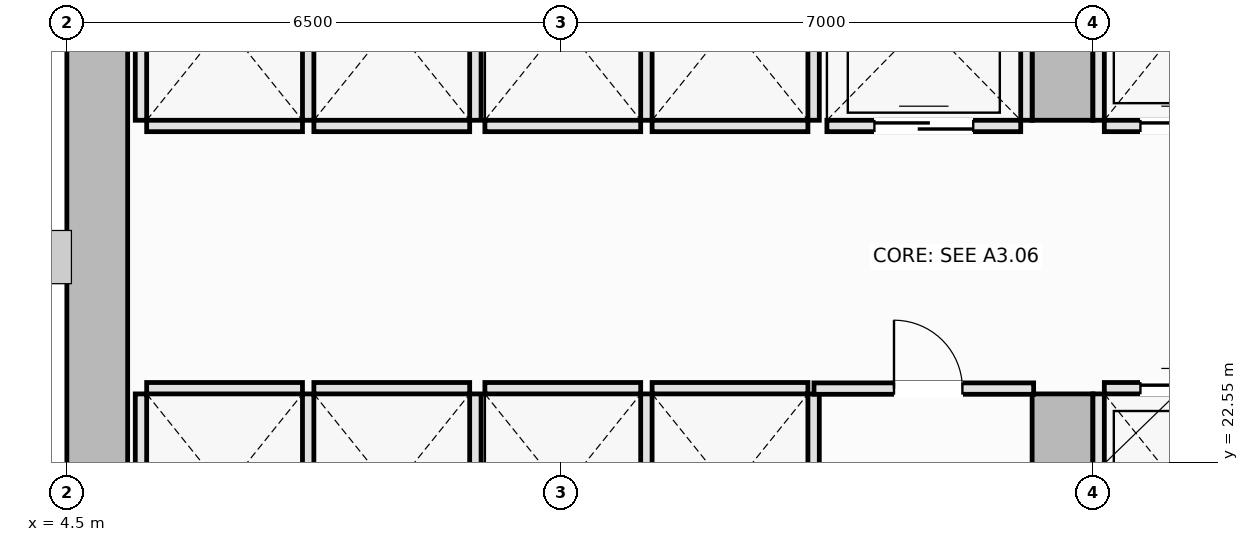
"""IFC4 building model, lengths in metres.
Left out: names, types, materials, properties, quantities, classifications, styles, units other than length and angle.
Written with IfcOpenShell. Run it as: python <this file> out.ifc"""

import sys

from ifc_helpers import new_model, si_unit, direction, frame, frame_2d, origin, place, context, subcontext, project, spatial, rectangle, extrude, element, fill, save


model = new_model("IFC4")
c1 = context("Model", 3, precision=1e-05, world=origin(), true_north=direction((0.0, 1.0)))
c2 = subcontext(c1, "Body", "Model", "MODEL_VIEW")
j1 = project(units=[si_unit("LENGTHUNIT", "METRE"), si_unit("PLANEANGLEUNIT", "RADIAN")], contexts=[c1])
p1 = place(None, origin())
s1 = spatial("IfcSite", under=j1, at=p1, CompositionType="ELEMENT")
p2 = place(p1, origin())
s2 = spatial("IfcBuilding", under=s1, at=p2, CompositionType="ELEMENT")
p3 = place(p2, frame((0.0, 0.0, 82.4)))
s3 = spatial("IfcBuildingStorey", under=s2, at=p3, CompositionType="ELEMENT", Elevation=82.4)
p4 = place(p3, frame((4.9, 14.8, 0.0), z_axis=(0.0, 0.0, 1.0), x_axis=(0.0, 1.0, 0.0)))
e1 = element("IfcWall", 1, at=p4, inside=s3, PredefinedType="SHEAR", context=c2, shape_type="SweptSolid", body=[
    extrude(rectangle(XDim=20.9, YDim=0.8, at=frame_2d((10.45, 0.0))), origin(), (0.0, 0.0, 1.0), 3.55),
])
p5 = place(p3, frame((17.6, 14.8, 0.0), z_axis=(0.0, 0.0, 1.0), x_axis=(0.0, 1.0, 0.0)))
e2 = element("IfcWall", 2, at=p5, inside=s3, PredefinedType="SHEAR", context=c2, shape_type="SweptSolid", body=[
    extrude(rectangle(XDim=8.65, YDim=0.8, at=frame_2d((4.325, 0.0))), origin(), (0.0, 0.0, 1.0), 3.55),
])
p6 = place(p5, frame((4.1, 0.0, 0.0)))
e3 = element("IfcOpeningElement", 3, at=p6, cuts=e2, PredefinedType="OPENING", context=c2, shape_type="SweptSolid", body=[
    extrude(rectangle(XDim=1.1, YDim=2.15, at=frame_2d((0.55, 1.075))), frame((0.0, 0.41, 0.0), z_axis=(0.0, -1.0, 0.0), x_axis=(1.0, 0.0, 0.0)), (0.0, 0.0, 1.0), 0.82),
])
p7 = place(p3, frame((17.6, 27.05, 0.0), z_axis=(0.0, 0.0, 1.0), x_axis=(0.0, 1.0, 0.0)))
e4 = element("IfcWall", 4, at=p7, inside=s3, PredefinedType="SHEAR", context=c2, shape_type="SweptSolid", body=[
    extrude(rectangle(XDim=8.65, YDim=0.8, at=frame_2d((4.325, 0.0))), origin(), (0.0, 0.0, 1.0), 3.55),
])
p8 = place(p7, frame((3.45, 0.0, 0.0)))
e5 = element("IfcOpeningElement", 5, at=p8, cuts=e4, PredefinedType="OPENING", context=c2, shape_type="SweptSolid", body=[
    extrude(rectangle(XDim=1.1, YDim=2.15, at=frame_2d((0.55, 1.075))), frame((0.0, 0.41, 0.0), z_axis=(0.0, -1.0, 0.0), x_axis=(1.0, 0.0, 0.0)), (0.0, 0.0, 1.0), 0.82),
])
p9 = place(p3, frame((18.15, 23.525, 0.0), z_axis=(0.0, 0.0, 1.0), x_axis=(1.0, 0.0, 0.0)))
e6 = element("IfcWall", 6, at=p9, inside=s3, PredefinedType="PARTITIONING", context=c2, shape_type="SweptSolid", body=[
    extrude(rectangle(XDim=2.05, YDim=0.15, at=frame_2d((1.025, 0.0))), origin(), (0.0, 0.0, 1.0), 3.37),
])
p10 = place(p9, frame((0.475, 0.0, 0.0)))
e7 = element("IfcOpeningElement", 7, at=p10, cuts=e6, PredefinedType="OPENING", context=c2, shape_type="SweptSolid", body=[
    extrude(rectangle(XDim=1.1, YDim=2.2, at=frame_2d((0.55, 1.1))), frame((0.0, 0.085, 0.0), z_axis=(0.0, -1.0, 0.0), x_axis=(1.0, 0.0, 0.0)), (0.0, 0.0, 1.0), 0.17),
])
p11 = place(p3, frame((18.075, 20.9, 0.0), z_axis=(0.0, 0.0, 1.0), x_axis=(0.0, 1.0, 0.0)))
e8 = element("IfcWall", 8, at=p11, inside=s3, PredefinedType="PARTITIONING", context=c2, shape_type="SweptSolid", body=[
    extrude(rectangle(XDim=2.55, YDim=0.15, at=frame_2d((1.275, 0.0))), origin(), (0.0, 0.0, 1.0), 3.37),
])
p12 = place(p3, frame((18.15, 26.975, 0.0), z_axis=(0.0, 0.0, 1.0), x_axis=(1.0, 0.0, 0.0)))
e9 = element("IfcWall", 9, at=p12, inside=s3, PredefinedType="PARTITIONING", context=c2, shape_type="SweptSolid", body=[
    extrude(rectangle(XDim=2.05, YDim=0.15, at=frame_2d((1.025, 0.0))), origin(), (0.0, 0.0, 1.0), 3.37),
])
p13 = place(p12, frame((0.475, 0.0, 0.0)))
e10 = element("IfcOpeningElement", 10, at=p13, cuts=e9, PredefinedType="OPENING", context=c2, shape_type="SweptSolid", body=[
    extrude(rectangle(XDim=1.1, YDim=2.2, at=frame_2d((0.55, 1.1))), frame((0.0, 0.085, 0.0), z_axis=(0.0, -1.0, 0.0), x_axis=(1.0, 0.0, 0.0)), (0.0, 0.0, 1.0), 0.17),
])
p14 = place(p3, frame((18.075, 27.05, 0.0), z_axis=(0.0, 0.0, 1.0), x_axis=(0.0, 1.0, 0.0)))
e11 = element("IfcWall", 11, at=p14, inside=s3, PredefinedType="PARTITIONING", context=c2, shape_type="SweptSolid", body=[
    extrude(rectangle(XDim=2.55, YDim=0.15, at=frame_2d((1.275, 0.0))), origin(), (0.0, 0.0, 1.0), 3.37),
])
p15 = place(p3, frame((5.55, 23.525, 0.0), z_axis=(0.0, 0.0, 1.0), x_axis=(1.0, 0.0, 0.0)))
e12 = element("IfcWall", 12, at=p15, inside=s3, PredefinedType="PARTITIONING", context=c2, shape_type="SweptSolid", body=[
    extrude(rectangle(XDim=2.05, YDim=0.15, at=frame_2d((1.025, 0.0))), origin(), (0.0, 0.0, 1.0), 3.37),
])
for number, where, z_axis, x_axis in (
    (13, (5.475, 20.9, 0.0), (0.0, 0.0, 1.0), (0.0, 1.0, 0.0)),
    (14, (7.675, 20.9, 0.0), (0.0, 0.0, 1.0), (0.0, 1.0, 0.0)),
):
    element("IfcWall", number, at=place(p3, frame(where, z_axis=z_axis, x_axis=x_axis)), inside=s3, PredefinedType="PARTITIONING", context=c2, shape_type="SweptSolid", body=[
        extrude(rectangle(XDim=2.55, YDim=0.15, at=frame_2d((1.275, 0.0))), origin(), (0.0, 0.0, 1.0), 3.37),
    ])
p16 = place(p3, frame((7.75, 23.525, 0.0), z_axis=(0.0, 0.0, 1.0), x_axis=(1.0, 0.0, 0.0)))
e15 = element("IfcWall", 15, at=p16, inside=s3, PredefinedType="PARTITIONING", context=c2, shape_type="SweptSolid", body=[
    extrude(rectangle(XDim=2.05, YDim=0.15, at=frame_2d((1.025, 0.0))), origin(), (0.0, 0.0, 1.0), 3.37),
])
p17 = place(p3, frame((9.875, 20.9, 0.0), z_axis=(0.0, 0.0, 1.0), x_axis=(0.0, 1.0, 0.0)))
e16 = element("IfcWall", 16, at=p17, inside=s3, PredefinedType="PARTITIONING", context=c2, shape_type="SweptSolid", body=[
    extrude(rectangle(XDim=2.55, YDim=0.15, at=frame_2d((1.275, 0.0))), origin(), (0.0, 0.0, 1.0), 3.37),
])
p18 = place(p3, frame((5.55, 26.975, 0.0), z_axis=(0.0, 0.0, 1.0), x_axis=(1.0, 0.0, 0.0)))
e17 = element("IfcWall", 17, at=p18, inside=s3, PredefinedType="PARTITIONING", context=c2, shape_type="SweptSolid", body=[
    extrude(rectangle(XDim=2.05, YDim=0.15, at=frame_2d((1.025, 0.0))), origin(), (0.0, 0.0, 1.0), 3.37),
])
for number, where, z_axis, x_axis in (
    (18, (5.475, 27.05, 0.0), (0.0, 0.0, 1.0), (0.0, 1.0, 0.0)),
    (19, (7.675, 27.05, 0.0), (0.0, 0.0, 1.0), (0.0, 1.0, 0.0)),
):
    element("IfcWall", number, at=place(p3, frame(where, z_axis=z_axis, x_axis=x_axis)), inside=s3, PredefinedType="PARTITIONING", context=c2, shape_type="SweptSolid", body=[
        extrude(rectangle(XDim=2.55, YDim=0.15, at=frame_2d((1.275, 0.0))), origin(), (0.0, 0.0, 1.0), 3.37),
    ])
p19 = place(p3, frame((7.75, 26.975, 0.0), z_axis=(0.0, 0.0, 1.0), x_axis=(1.0, 0.0, 0.0)))
e20 = element("IfcWall", 20, at=p19, inside=s3, PredefinedType="PARTITIONING", context=c2, shape_type="SweptSolid", body=[
    extrude(rectangle(XDim=2.05, YDim=0.15, at=frame_2d((1.025, 0.0))), origin(), (0.0, 0.0, 1.0), 3.37),
])
p20 = place(p3, frame((9.875, 27.05, 0.0), z_axis=(0.0, 0.0, 1.0), x_axis=(0.0, 1.0, 0.0)))
e21 = element("IfcWall", 21, at=p20, inside=s3, PredefinedType="PARTITIONING", context=c2, shape_type="SweptSolid", body=[
    extrude(rectangle(XDim=2.55, YDim=0.15, at=frame_2d((1.275, 0.0))), origin(), (0.0, 0.0, 1.0), 3.37),
])
p21 = place(p3, frame((10.0, 23.525, 0.0), z_axis=(0.0, 0.0, 1.0), x_axis=(1.0, 0.0, 0.0)))
e22 = element("IfcWall", 22, at=p21, inside=s3, PredefinedType="PARTITIONING", context=c2, shape_type="SweptSolid", body=[
    extrude(rectangle(XDim=2.05, YDim=0.15, at=frame_2d((1.025, 0.0))), origin(), (0.0, 0.0, 1.0), 3.37),
])
p22 = place(p3, frame((12.125, 20.9, 0.0), z_axis=(0.0, 0.0, 1.0), x_axis=(0.0, 1.0, 0.0)))
e23 = element("IfcWall", 23, at=p22, inside=s3, PredefinedType="PARTITIONING", context=c2, shape_type="SweptSolid", body=[
    extrude(rectangle(XDim=2.55, YDim=0.15, at=frame_2d((1.275, 0.0))), origin(), (0.0, 0.0, 1.0), 3.37),
])
p23 = place(p3, frame((12.2, 23.525, 0.0), z_axis=(0.0, 0.0, 1.0), x_axis=(1.0, 0.0, 0.0)))
e24 = element("IfcWall", 24, at=p23, inside=s3, PredefinedType="PARTITIONING", context=c2, shape_type="SweptSolid", body=[
    extrude(rectangle(XDim=2.05, YDim=0.15, at=frame_2d((1.025, 0.0))), origin(), (0.0, 0.0, 1.0), 3.37),
])
p24 = place(p3, frame((14.325, 20.9, 0.0), z_axis=(0.0, 0.0, 1.0), x_axis=(0.0, 1.0, 0.0)))
e25 = element("IfcWall", 25, at=p24, inside=s3, PredefinedType="PARTITIONING", context=c2, shape_type="SweptSolid", body=[
    extrude(rectangle(XDim=2.55, YDim=0.15, at=frame_2d((1.275, 0.0))), origin(), (0.0, 0.0, 1.0), 3.37),
])
p25 = place(p3, frame((10.0, 26.975, 0.0), z_axis=(0.0, 0.0, 1.0), x_axis=(1.0, 0.0, 0.0)))
e26 = element("IfcWall", 26, at=p25, inside=s3, PredefinedType="PARTITIONING", context=c2, shape_type="SweptSolid", body=[
    extrude(rectangle(XDim=2.05, YDim=0.15, at=frame_2d((1.025, 0.0))), origin(), (0.0, 0.0, 1.0), 3.37),
])
p26 = place(p3, frame((12.125, 27.05, 0.0), z_axis=(0.0, 0.0, 1.0), x_axis=(0.0, 1.0, 0.0)))
e27 = element("IfcWall", 27, at=p26, inside=s3, PredefinedType="PARTITIONING", context=c2, shape_type="SweptSolid", body=[
    extrude(rectangle(XDim=2.55, YDim=0.15, at=frame_2d((1.275, 0.0))), origin(), (0.0, 0.0, 1.0), 3.37),
])
p27 = place(p3, frame((12.2, 26.975, 0.0), z_axis=(0.0, 0.0, 1.0), x_axis=(1.0, 0.0, 0.0)))
e28 = element("IfcWall", 28, at=p27, inside=s3, PredefinedType="PARTITIONING", context=c2, shape_type="SweptSolid", body=[
    extrude(rectangle(XDim=2.05, YDim=0.15, at=frame_2d((1.025, 0.0))), origin(), (0.0, 0.0, 1.0), 3.37),
])
p28 = place(p3, frame((14.325, 27.05, 0.0), z_axis=(0.0, 0.0, 1.0), x_axis=(0.0, 1.0, 0.0)))
e29 = element("IfcWall", 29, at=p28, inside=s3, PredefinedType="PARTITIONING", context=c2, shape_type="SweptSolid", body=[
    extrude(rectangle(XDim=2.55, YDim=0.15, at=frame_2d((1.275, 0.0))), origin(), (0.0, 0.0, 1.0), 3.37),
])
p29 = place(p3, frame((14.5, 26.975, 0.0), z_axis=(0.0, 0.0, 1.0), x_axis=(1.0, 0.0, 0.0)))
e30 = element("IfcWall", 30, at=p29, inside=s3, PredefinedType="PARTITIONING", context=c2, shape_type="SweptSolid", body=[
    extrude(rectangle(XDim=2.55, YDim=0.15, at=frame_2d((1.275, 0.0))), origin(), (0.0, 0.0, 1.0), 3.37),
])
p30 = place(p29, frame((0.625, 0.0, 0.0)))
e31 = element("IfcOpeningElement", 31, at=p30, cuts=e30, PredefinedType="OPENING", context=c2, shape_type="SweptSolid", body=[
    extrude(rectangle(XDim=1.3, YDim=2.2, at=frame_2d((0.65, 1.1))), frame((0.0, 0.085, 0.0), z_axis=(0.0, -1.0, 0.0), x_axis=(1.0, 0.0, 0.0)), (0.0, 0.0, 1.0), 0.17),
])
p31 = place(p3, frame((17.125, 27.05, 0.0), z_axis=(0.0, 0.0, 1.0), x_axis=(0.0, 1.0, 0.0)))
e32 = element("IfcWall", 32, at=p31, inside=s3, PredefinedType="PARTITIONING", context=c2, shape_type="SweptSolid", body=[
    extrude(rectangle(XDim=2.6, YDim=0.15, at=frame_2d((1.3, 0.0))), origin(), (0.0, 0.0, 1.0), 3.37),
])
p32 = place(p3, frame((14.33, 23.52, 0.0), z_axis=(0.0, 0.0, 1.0), x_axis=(1.0, 0.0, 0.0)))
e33 = element("IfcWall", 33, at=p32, inside=s3, PredefinedType="PARTITIONING", context=c2, shape_type="SweptSolid", body=[
    extrude(rectangle(XDim=2.89, YDim=0.15, at=frame_2d((1.445, 0.0))), origin(), (0.0, 0.0, 1.0), 3.37),
])
p33 = place(p32, frame((1.053, 0.0, 0.0)))
e34 = element("IfcOpeningElement", 34, at=p33, cuts=e33, PredefinedType="OPENING", context=c2, shape_type="SweptSolid", body=[
    extrude(rectangle(XDim=0.9, YDim=2.1, at=frame_2d((0.45, 1.05))), frame((0.0, 0.085, 0.0), z_axis=(0.0, -1.0, 0.0), x_axis=(1.0, 0.0, 0.0)), (0.0, 0.0, 1.0), 0.17),
])
p34 = place(p10, origin())
e35 = element("IfcDoor", 35, at=p34, inside=s3, OperationType="DOUBLE_DOOR_SLIDING", PredefinedType="DOOR", context=c2, shape_type="SweptSolid", body=[
    extrude(rectangle(XDim=1.1, YDim=2.2, at=frame_2d((0.55, 1.1))), frame((0.0, 0.025, 0.0), z_axis=(0.0, -1.0, 0.0), x_axis=(1.0, 0.0, 0.0)), (0.0, 0.0, 1.0), 0.05),
])
fill(e7, e35)
p35 = place(p13, origin())
e36 = element("IfcDoor", 36, at=p35, inside=s3, OperationType="DOUBLE_DOOR_SLIDING", PredefinedType="DOOR", context=c2, shape_type="SweptSolid", body=[
    extrude(rectangle(XDim=1.1, YDim=2.2, at=frame_2d((0.55, 1.1))), frame((0.0, 0.025, 0.0), z_axis=(0.0, -1.0, 0.0), x_axis=(1.0, 0.0, 0.0)), (0.0, 0.0, 1.0), 0.05),
])
fill(e10, e36)
p36 = place(p30, origin())
e37 = element("IfcDoor", 37, at=p36, inside=s3, OperationType="DOUBLE_DOOR_SLIDING", PredefinedType="DOOR", context=c2, shape_type="SweptSolid", body=[
    extrude(rectangle(XDim=1.3, YDim=2.2, at=frame_2d((0.65, 1.1))), frame((0.0, 0.025, 0.0), z_axis=(0.0, -1.0, 0.0), x_axis=(1.0, 0.0, 0.0)), (0.0, 0.0, 1.0), 0.05),
])
fill(e31, e37)
p37 = place(p33, origin())
e38 = element("IfcDoor", 38, at=p37, inside=s3, OperationType="SINGLE_SWING_LEFT", PredefinedType="DOOR", context=c2, shape_type="SweptSolid", body=[
    extrude(rectangle(XDim=0.9, YDim=2.1, at=frame_2d((0.45, 1.05))), frame((0.0, 0.025, 0.0), z_axis=(0.0, -1.0, 0.0), x_axis=(1.0, 0.0, 0.0)), (0.0, 0.0, 1.0), 0.05),
])
fill(e34, e38)
save(model, sys.argv[1])
